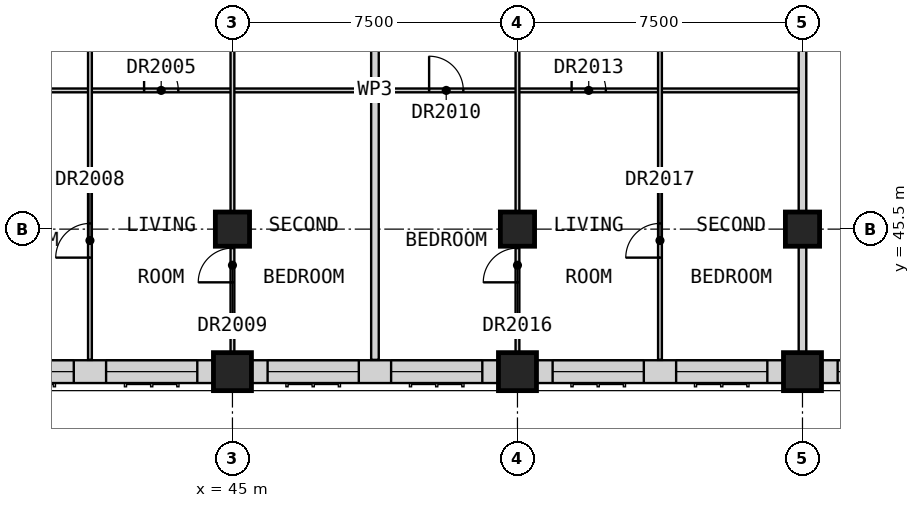
"""IFC4 building model, lengths in metres.
Left out: names, types, materials, properties, quantities, classifications, styles, units other than length and angle.
Written with IfcOpenShell. Run it as: python <this file> out.ifc"""

import sys

from ifc_helpers import new_model, si_unit, direction, frame, frame_2d, origin, origin_2d, place, context, subcontext, project, spatial, rectangle, extrude, element, fill, save


model = new_model("IFC4")
c1 = context("Model", 3, precision=1e-05, world=origin(), true_north=direction((0.0, 1.0)))
c2 = subcontext(c1, "Body", "Model", "MODEL_VIEW")
j1 = project(units=[si_unit("LENGTHUNIT", "METRE"), si_unit("PLANEANGLEUNIT", "RADIAN")], contexts=[c1])
p1 = place(None, origin())
s1 = spatial("IfcSite", under=j1, at=p1, CompositionType="ELEMENT")
p2 = place(p1, origin())
s2 = spatial("IfcBuilding", under=s1, at=p2, CompositionType="ELEMENT")
p3 = place(p2, frame((0.0, 0.0, 182.7)))
s3 = spatial("IfcBuildingStorey", under=s2, at=p3, CompositionType="ELEMENT", Elevation=182.7)
for number, where, z_axis, x_axis in (
    (1, (45.0, 41.75, 0.0), (0.0, 0.0, 1.0), (1.0, 0.0, 0.0)),
    (2, (52.5, 41.75, 0.0), (0.0, 0.0, 1.0), (1.0, 0.0, 0.0)),
    (3, (60.0, 41.75, 0.0), (0.0, 0.0, 1.0), (1.0, 0.0, 0.0)),
):
    element("IfcColumn", number, at=place(p3, frame(where, z_axis=z_axis, x_axis=x_axis)), inside=s3, PredefinedType="COLUMN", context=c2, shape_type="SweptSolid", body=[
        extrude(rectangle(XDim=1.0, YDim=1.0, at=origin_2d()), origin(), (0.0, 0.0, 1.0), 3.5),
    ])
for number, where, z_axis, x_axis in (
    (4, (45.0, 45.5, 0.0), (0.0, 0.0, 1.0), (1.0, 0.0, 0.0)),
    (5, (52.5, 45.5, 0.0), (0.0, 0.0, 1.0), (1.0, 0.0, 0.0)),
    (6, (60.0, 45.5, 0.0), (0.0, 0.0, 1.0), (1.0, 0.0, 0.0)),
):
    element("IfcColumn", number, at=place(p3, frame(where, z_axis=z_axis, x_axis=x_axis)), inside=s3, PredefinedType="COLUMN", context=c2, shape_type="SweptSolid", body=[
        extrude(rectangle(XDim=0.9, YDim=0.9, at=origin_2d()), origin(), (0.0, 0.0, 1.0), 3.5),
    ])
p4 = place(p3, frame((38.0, 41.75, 0.0), z_axis=(0.0, 0.0, 1.0), x_axis=(1.0, 0.0, 0.0)))
e7 = element("IfcWall", 7, at=p4, inside=s3, PredefinedType="SOLIDWALL", context=c2, shape_type="SweptSolid", body=[
    extrude(rectangle(XDim=6.5, YDim=0.6, at=frame_2d((3.25, 0.0))), origin(), (0.0, 0.0, 1.0), 2.75),
])
p5 = place(p4, frame((0.425, 0.0, 0.8)))
e8 = element("IfcOpeningElement", 8, at=p5, cuts=e7, PredefinedType="OPENING", context=c2, shape_type="SweptSolid", body=[
    extrude(rectangle(XDim=2.4, YDim=1.8, at=frame_2d((1.2, 0.9))), frame((0.0, 0.31, 0.0), z_axis=(0.0, -1.0, 0.0), x_axis=(1.0, 0.0, 0.0)), (0.0, 0.0, 1.0), 0.62),
])
p6 = place(p4, frame((3.675, 0.0, 0.8)))
e9 = element("IfcOpeningElement", 9, at=p6, cuts=e7, PredefinedType="OPENING", context=c2, shape_type="SweptSolid", body=[
    extrude(rectangle(XDim=2.4, YDim=1.8, at=frame_2d((1.2, 0.9))), frame((0.0, 0.31, 0.0), z_axis=(0.0, -1.0, 0.0), x_axis=(1.0, 0.0, 0.0)), (0.0, 0.0, 1.0), 0.62),
])
p7 = place(p3, frame((45.5, 41.75, 0.0), z_axis=(0.0, 0.0, 1.0), x_axis=(1.0, 0.0, 0.0)))
e10 = element("IfcWall", 10, at=p7, inside=s3, PredefinedType="SOLIDWALL", context=c2, shape_type="SweptSolid", body=[
    extrude(rectangle(XDim=6.5, YDim=0.6, at=frame_2d((3.25, 0.0))), origin(), (0.0, 0.0, 1.0), 2.75),
])
p8 = place(p7, frame((0.425, 0.0, 0.8)))
e11 = element("IfcOpeningElement", 11, at=p8, cuts=e10, PredefinedType="OPENING", context=c2, shape_type="SweptSolid", body=[
    extrude(rectangle(XDim=2.4, YDim=1.8, at=frame_2d((1.2, 0.9))), frame((0.0, 0.31, 0.0), z_axis=(0.0, -1.0, 0.0), x_axis=(1.0, 0.0, 0.0)), (0.0, 0.0, 1.0), 0.62),
])
p9 = place(p7, frame((3.675, 0.0, 0.8)))
e12 = element("IfcOpeningElement", 12, at=p9, cuts=e10, PredefinedType="OPENING", context=c2, shape_type="SweptSolid", body=[
    extrude(rectangle(XDim=2.4, YDim=1.8, at=frame_2d((1.2, 0.9))), frame((0.0, 0.31, 0.0), z_axis=(0.0, -1.0, 0.0), x_axis=(1.0, 0.0, 0.0)), (0.0, 0.0, 1.0), 0.62),
])
p10 = place(p3, frame((53.0, 41.75, 0.0), z_axis=(0.0, 0.0, 1.0), x_axis=(1.0, 0.0, 0.0)))
e13 = element("IfcWall", 13, at=p10, inside=s3, PredefinedType="SOLIDWALL", context=c2, shape_type="SweptSolid", body=[
    extrude(rectangle(XDim=6.5, YDim=0.6, at=frame_2d((3.25, 0.0))), origin(), (0.0, 0.0, 1.0), 2.75),
])
p11 = place(p10, frame((0.425, 0.0, 0.8)))
e14 = element("IfcOpeningElement", 14, at=p11, cuts=e13, PredefinedType="OPENING", context=c2, shape_type="SweptSolid", body=[
    extrude(rectangle(XDim=2.4, YDim=1.8, at=frame_2d((1.2, 0.9))), frame((0.0, 0.31, 0.0), z_axis=(0.0, -1.0, 0.0), x_axis=(1.0, 0.0, 0.0)), (0.0, 0.0, 1.0), 0.62),
])
p12 = place(p10, frame((3.675, 0.0, 0.8)))
e15 = element("IfcOpeningElement", 15, at=p12, cuts=e13, PredefinedType="OPENING", context=c2, shape_type="SweptSolid", body=[
    extrude(rectangle(XDim=2.4, YDim=1.8, at=frame_2d((1.2, 0.9))), frame((0.0, 0.31, 0.0), z_axis=(0.0, -1.0, 0.0), x_axis=(1.0, 0.0, 0.0)), (0.0, 0.0, 1.0), 0.62),
])
p13 = place(p3, frame((60.5, 41.75, 0.0), z_axis=(0.0, 0.0, 1.0), x_axis=(1.0, 0.0, 0.0)))
e16 = element("IfcWall", 16, at=p13, inside=s3, PredefinedType="SOLIDWALL", context=c2, shape_type="SweptSolid", body=[
    extrude(rectangle(XDim=6.5, YDim=0.6, at=frame_2d((3.25, 0.0))), origin(), (0.0, 0.0, 1.0), 2.75),
])
p14 = place(p13, frame((0.425, 0.0, 0.8)))
e17 = element("IfcOpeningElement", 17, at=p14, cuts=e16, PredefinedType="OPENING", context=c2, shape_type="SweptSolid", body=[
    extrude(rectangle(XDim=2.4, YDim=1.8, at=frame_2d((1.2, 0.9))), frame((0.0, 0.31, 0.0), z_axis=(0.0, -1.0, 0.0), x_axis=(1.0, 0.0, 0.0)), (0.0, 0.0, 1.0), 0.62),
])
p15 = place(p13, frame((3.675, 0.0, 0.8)))
e18 = element("IfcOpeningElement", 18, at=p15, cuts=e16, PredefinedType="OPENING", context=c2, shape_type="SweptSolid", body=[
    extrude(rectangle(XDim=2.4, YDim=1.8, at=frame_2d((1.2, 0.9))), frame((0.0, 0.31, 0.0), z_axis=(0.0, -1.0, 0.0), x_axis=(1.0, 0.0, 0.0)), (0.0, 0.0, 1.0), 0.62),
])
p16 = place(p3, frame((48.75, 42.06, 0.0), z_axis=(0.0, 0.0, 1.0), x_axis=(0.0, 1.0, 0.0)))
e19 = element("IfcWall", 19, at=p16, inside=s3, PredefinedType="PARTITIONING", context=c2, shape_type="SweptSolid", body=[
    extrude(rectangle(XDim=15.765, YDim=0.2, at=frame_2d((7.882, 0.0))), origin(), (0.0, 0.0, 1.0), 3.25),
])
p17 = place(p3, frame((60.0, 41.25, 0.0), z_axis=(0.0, 0.0, 1.0), x_axis=(0.0, 1.0, 0.0)))
e20 = element("IfcWall", 20, at=p17, inside=s3, PredefinedType="PARTITIONING", context=c2, shape_type="SweptSolid", body=[
    extrude(rectangle(XDim=16.575, YDim=0.2, at=frame_2d((8.288, 0.0))), origin(), (0.0, 0.0, 1.0), 3.25),
])
p18 = place(p3, frame((37.6, 49.15, 0.0), z_axis=(0.0, 0.0, 1.0), x_axis=(1.0, 0.0, 0.0)))
e21 = element("IfcWall", 21, at=p18, inside=s3, PredefinedType="PARTITIONING", context=c2, shape_type="SweptSolid", body=[
    extrude(rectangle(XDim=22.3, YDim=0.1, at=frame_2d((11.15, 0.0))), origin(), (0.0, 0.0, 1.0), 3.25),
])
p19 = place(p18, frame((1.325, 0.0, 0.0)))
e22 = element("IfcOpeningElement", 22, at=p19, cuts=e21, PredefinedType="OPENING", context=c2, shape_type="SweptSolid", body=[
    extrude(rectangle(XDim=0.9, YDim=2.1, at=frame_2d((0.45, 1.05))), frame((0.0, 0.06, 0.0), z_axis=(0.0, -1.0, 0.0), x_axis=(1.0, 0.0, 0.0)), (0.0, 0.0, 1.0), 0.12),
])
p20 = place(p18, frame((5.075, 0.0, 0.0)))
e23 = element("IfcOpeningElement", 23, at=p20, cuts=e21, PredefinedType="OPENING", context=c2, shape_type="SweptSolid", body=[
    extrude(rectangle(XDim=0.9, YDim=2.1, at=frame_2d((0.45, 1.05))), frame((0.0, 0.06, 0.0), z_axis=(0.0, -1.0, 0.0), x_axis=(1.0, 0.0, 0.0)), (0.0, 0.0, 1.0), 0.12),
])
p21 = place(p18, frame((12.575, 0.0, 0.0)))
e24 = element("IfcOpeningElement", 24, at=p21, cuts=e21, PredefinedType="OPENING", context=c2, shape_type="SweptSolid", body=[
    extrude(rectangle(XDim=0.9, YDim=2.1, at=frame_2d((0.45, 1.05))), frame((0.0, 0.06, 0.0), z_axis=(0.0, -1.0, 0.0), x_axis=(1.0, 0.0, 0.0)), (0.0, 0.0, 1.0), 0.12),
])
p22 = place(p18, frame((16.325, 0.0, 0.0)))
e25 = element("IfcOpeningElement", 25, at=p22, cuts=e21, PredefinedType="OPENING", context=c2, shape_type="SweptSolid", body=[
    extrude(rectangle(XDim=0.9, YDim=2.1, at=frame_2d((0.45, 1.05))), frame((0.0, 0.06, 0.0), z_axis=(0.0, -1.0, 0.0), x_axis=(1.0, 0.0, 0.0)), (0.0, 0.0, 1.0), 0.12),
])
p23 = place(p3, frame((41.25, 42.06, 0.0), z_axis=(0.0, 0.0, 1.0), x_axis=(0.0, 1.0, 0.0)))
e26 = element("IfcWall", 26, at=p23, inside=s3, PredefinedType="PARTITIONING", context=c2, shape_type="SweptSolid", body=[
    extrude(rectangle(XDim=11.402, YDim=0.1, at=frame_2d((5.701, 0.0))), origin(), (0.0, 0.0, 1.0), 3.25),
])
p24 = place(p23, frame((2.69, 0.0, 0.0)))
e27 = element("IfcOpeningElement", 27, at=p24, cuts=e26, PredefinedType="OPENING", context=c2, shape_type="SweptSolid", body=[
    extrude(rectangle(XDim=0.9, YDim=2.1, at=frame_2d((0.45, 1.05))), frame((0.0, 0.06, 0.0), z_axis=(0.0, -1.0, 0.0), x_axis=(1.0, 0.0, 0.0)), (0.0, 0.0, 1.0), 0.12),
])
p25 = place(p3, frame((45.0, 41.25, 0.0), z_axis=(0.0, 0.0, 1.0), x_axis=(0.0, 1.0, 0.0)))
e28 = element("IfcWall", 28, at=p25, inside=s3, PredefinedType="PARTITIONING", context=c2, shape_type="SweptSolid", body=[
    extrude(rectangle(XDim=12.212, YDim=0.1, at=frame_2d((6.106, 0.0))), origin(), (0.0, 0.0, 1.0), 3.25),
])
p26 = place(p25, frame((9.637, 0.0, 0.0)))
e29 = element("IfcOpeningElement", 29, at=p26, cuts=e28, PredefinedType="OPENING", context=c2, shape_type="SweptSolid", body=[
    extrude(rectangle(XDim=0.9, YDim=2.1, at=frame_2d((0.45, 1.05))), frame((0.0, 0.06, 0.0), z_axis=(0.0, -1.0, 0.0), x_axis=(1.0, 0.0, 0.0)), (0.0, 0.0, 1.0), 0.12),
])
p27 = place(p25, frame((2.85, 0.0, 0.0)))
e30 = element("IfcOpeningElement", 30, at=p27, cuts=e28, PredefinedType="OPENING", context=c2, shape_type="SweptSolid", body=[
    extrude(rectangle(XDim=0.9, YDim=2.1, at=frame_2d((0.45, 1.05))), frame((0.0, 0.06, 0.0), z_axis=(0.0, -1.0, 0.0), x_axis=(1.0, 0.0, 0.0)), (0.0, 0.0, 1.0), 0.12),
])
p28 = place(p3, frame((52.5, 41.25, 0.0), z_axis=(0.0, 0.0, 1.0), x_axis=(0.0, 1.0, 0.0)))
e31 = element("IfcWall", 31, at=p28, inside=s3, PredefinedType="PARTITIONING", context=c2, shape_type="SweptSolid", body=[
    extrude(rectangle(XDim=12.212, YDim=0.1, at=frame_2d((6.106, 0.0))), origin(), (0.0, 0.0, 1.0), 3.25),
])
p29 = place(p28, frame((2.85, 0.0, 0.0)))
e32 = element("IfcOpeningElement", 32, at=p29, cuts=e31, PredefinedType="OPENING", context=c2, shape_type="SweptSolid", body=[
    extrude(rectangle(XDim=0.9, YDim=2.1, at=frame_2d((0.45, 1.05))), frame((0.0, 0.06, 0.0), z_axis=(0.0, -1.0, 0.0), x_axis=(1.0, 0.0, 0.0)), (0.0, 0.0, 1.0), 0.12),
])
p30 = place(p3, frame((56.25, 42.06, 0.0), z_axis=(0.0, 0.0, 1.0), x_axis=(0.0, 1.0, 0.0)))
e33 = element("IfcWall", 33, at=p30, inside=s3, PredefinedType="PARTITIONING", context=c2, shape_type="SweptSolid", body=[
    extrude(rectangle(XDim=11.402, YDim=0.1, at=frame_2d((5.701, 0.0))), origin(), (0.0, 0.0, 1.0), 3.25),
])
p31 = place(p30, frame((8.827, 0.0, 0.0)))
e34 = element("IfcOpeningElement", 34, at=p31, cuts=e33, PredefinedType="OPENING", context=c2, shape_type="SweptSolid", body=[
    extrude(rectangle(XDim=0.9, YDim=2.1, at=frame_2d((0.45, 1.05))), frame((0.0, 0.06, 0.0), z_axis=(0.0, -1.0, 0.0), x_axis=(1.0, 0.0, 0.0)), (0.0, 0.0, 1.0), 0.12),
])
p32 = place(p30, frame((2.69, 0.0, 0.0)))
e35 = element("IfcOpeningElement", 35, at=p32, cuts=e33, PredefinedType="OPENING", context=c2, shape_type="SweptSolid", body=[
    extrude(rectangle(XDim=0.9, YDim=2.1, at=frame_2d((0.45, 1.05))), frame((0.0, 0.06, 0.0), z_axis=(0.0, -1.0, 0.0), x_axis=(1.0, 0.0, 0.0)), (0.0, 0.0, 1.0), 0.12),
])
p33 = place(p5, origin())
e36 = element("IfcWindow", 36, at=p33, inside=s3, PartitioningType="SINGLE_PANEL", PredefinedType="WINDOW", context=c2, shape_type="SweptSolid", body=[
    extrude(rectangle(XDim=2.4, YDim=1.8, at=frame_2d((1.2, 0.9))), frame((0.0, -0.07, 0.0), z_axis=(0.0, -1.0, 0.0), x_axis=(1.0, 0.0, 0.0)), (0.0, 0.0, 1.0), 0.06),
])
fill(e8, e36)
p34 = place(p6, origin())
e37 = element("IfcWindow", 37, at=p34, inside=s3, PartitioningType="SINGLE_PANEL", PredefinedType="WINDOW", context=c2, shape_type="SweptSolid", body=[
    extrude(rectangle(XDim=2.4, YDim=1.8, at=frame_2d((1.2, 0.9))), frame((0.0, -0.07, 0.0), z_axis=(0.0, -1.0, 0.0), x_axis=(1.0, 0.0, 0.0)), (0.0, 0.0, 1.0), 0.06),
])
fill(e9, e37)
p35 = place(p8, origin())
e38 = element("IfcWindow", 38, at=p35, inside=s3, PartitioningType="SINGLE_PANEL", PredefinedType="WINDOW", context=c2, shape_type="SweptSolid", body=[
    extrude(rectangle(XDim=2.4, YDim=1.8, at=frame_2d((1.2, 0.9))), frame((0.0, -0.07, 0.0), z_axis=(0.0, -1.0, 0.0), x_axis=(1.0, 0.0, 0.0)), (0.0, 0.0, 1.0), 0.06),
])
fill(e11, e38)
p36 = place(p9, origin())
e39 = element("IfcWindow", 39, at=p36, inside=s3, PartitioningType="SINGLE_PANEL", PredefinedType="WINDOW", context=c2, shape_type="SweptSolid", body=[
    extrude(rectangle(XDim=2.4, YDim=1.8, at=frame_2d((1.2, 0.9))), frame((0.0, -0.07, 0.0), z_axis=(0.0, -1.0, 0.0), x_axis=(1.0, 0.0, 0.0)), (0.0, 0.0, 1.0), 0.06),
])
fill(e12, e39)
p37 = place(p11, origin())
e40 = element("IfcWindow", 40, at=p37, inside=s3, PartitioningType="SINGLE_PANEL", PredefinedType="WINDOW", context=c2, shape_type="SweptSolid", body=[
    extrude(rectangle(XDim=2.4, YDim=1.8, at=frame_2d((1.2, 0.9))), frame((0.0, -0.07, 0.0), z_axis=(0.0, -1.0, 0.0), x_axis=(1.0, 0.0, 0.0)), (0.0, 0.0, 1.0), 0.06),
])
fill(e14, e40)
p38 = place(p12, origin())
e41 = element("IfcWindow", 41, at=p38, inside=s3, PartitioningType="SINGLE_PANEL", PredefinedType="WINDOW", context=c2, shape_type="SweptSolid", body=[
    extrude(rectangle(XDim=2.4, YDim=1.8, at=frame_2d((1.2, 0.9))), frame((0.0, -0.07, 0.0), z_axis=(0.0, -1.0, 0.0), x_axis=(1.0, 0.0, 0.0)), (0.0, 0.0, 1.0), 0.06),
])
fill(e15, e41)
p39 = place(p14, origin())
e42 = element("IfcWindow", 42, at=p39, inside=s3, PartitioningType="SINGLE_PANEL", PredefinedType="WINDOW", context=c2, shape_type="SweptSolid", body=[
    extrude(rectangle(XDim=2.4, YDim=1.8, at=frame_2d((1.2, 0.9))), frame((0.0, -0.07, 0.0), z_axis=(0.0, -1.0, 0.0), x_axis=(1.0, 0.0, 0.0)), (0.0, 0.0, 1.0), 0.06),
])
fill(e17, e42)
p40 = place(p20, origin())
e43 = element("IfcDoor", 43, at=p40, inside=s3, OperationType="SINGLE_SWING_LEFT", PredefinedType="DOOR", context=c2, shape_type="SweptSolid", body=[
    extrude(rectangle(XDim=0.9, YDim=2.1, at=frame_2d((0.45, 1.05))), frame((0.0, 0.025, 0.0), z_axis=(0.0, -1.0, 0.0), x_axis=(1.0, 0.0, 0.0)), (0.0, 0.0, 1.0), 0.05),
])
fill(e23, e43)
p41 = place(p24, origin())
e44 = element("IfcDoor", 44, at=p41, inside=s3, OperationType="SINGLE_SWING_LEFT", PredefinedType="DOOR", context=c2, shape_type="SweptSolid", body=[
    extrude(rectangle(XDim=0.9, YDim=2.1, at=frame_2d((0.45, 1.05))), frame((0.0, 0.025, 0.0), z_axis=(0.0, -1.0, 0.0), x_axis=(1.0, 0.0, 0.0)), (0.0, 0.0, 1.0), 0.05),
])
fill(e27, e44)
p42 = place(p27, origin())
e45 = element("IfcDoor", 45, at=p42, inside=s3, OperationType="SINGLE_SWING_LEFT", PredefinedType="DOOR", context=c2, shape_type="SweptSolid", body=[
    extrude(rectangle(XDim=0.9, YDim=2.1, at=frame_2d((0.45, 1.05))), frame((0.0, 0.025, 0.0), z_axis=(0.0, -1.0, 0.0), x_axis=(1.0, 0.0, 0.0)), (0.0, 0.0, 1.0), 0.05),
])
fill(e30, e45)
p43 = place(p21, origin())
e46 = element("IfcDoor", 46, at=p43, inside=s3, OperationType="SINGLE_SWING_LEFT", PredefinedType="DOOR", context=c2, shape_type="SweptSolid", body=[
    extrude(rectangle(XDim=0.9, YDim=2.1, at=frame_2d((0.45, 1.05))), frame((0.0, 0.025, 0.0), z_axis=(0.0, -1.0, 0.0), x_axis=(1.0, 0.0, 0.0)), (0.0, 0.0, 1.0), 0.05),
])
fill(e24, e46)
p44 = place(p22, origin())
e47 = element("IfcDoor", 47, at=p44, inside=s3, OperationType="SINGLE_SWING_LEFT", PredefinedType="DOOR", context=c2, shape_type="SweptSolid", body=[
    extrude(rectangle(XDim=0.9, YDim=2.1, at=frame_2d((0.45, 1.05))), frame((0.0, 0.025, 0.0), z_axis=(0.0, -1.0, 0.0), x_axis=(1.0, 0.0, 0.0)), (0.0, 0.0, 1.0), 0.05),
])
fill(e25, e47)
p45 = place(p29, origin())
e48 = element("IfcDoor", 48, at=p45, inside=s3, OperationType="SINGLE_SWING_LEFT", PredefinedType="DOOR", context=c2, shape_type="SweptSolid", body=[
    extrude(rectangle(XDim=0.9, YDim=2.1, at=frame_2d((0.45, 1.05))), frame((0.0, 0.025, 0.0), z_axis=(0.0, -1.0, 0.0), x_axis=(1.0, 0.0, 0.0)), (0.0, 0.0, 1.0), 0.05),
])
fill(e32, e48)
p46 = place(p32, origin())
e49 = element("IfcDoor", 49, at=p46, inside=s3, OperationType="SINGLE_SWING_LEFT", PredefinedType="DOOR", context=c2, shape_type="SweptSolid", body=[
    extrude(rectangle(XDim=0.9, YDim=2.1, at=frame_2d((0.45, 1.05))), frame((0.0, 0.025, 0.0), z_axis=(0.0, -1.0, 0.0), x_axis=(1.0, 0.0, 0.0)), (0.0, 0.0, 1.0), 0.05),
])
fill(e35, e49)
save(model, sys.argv[1])
